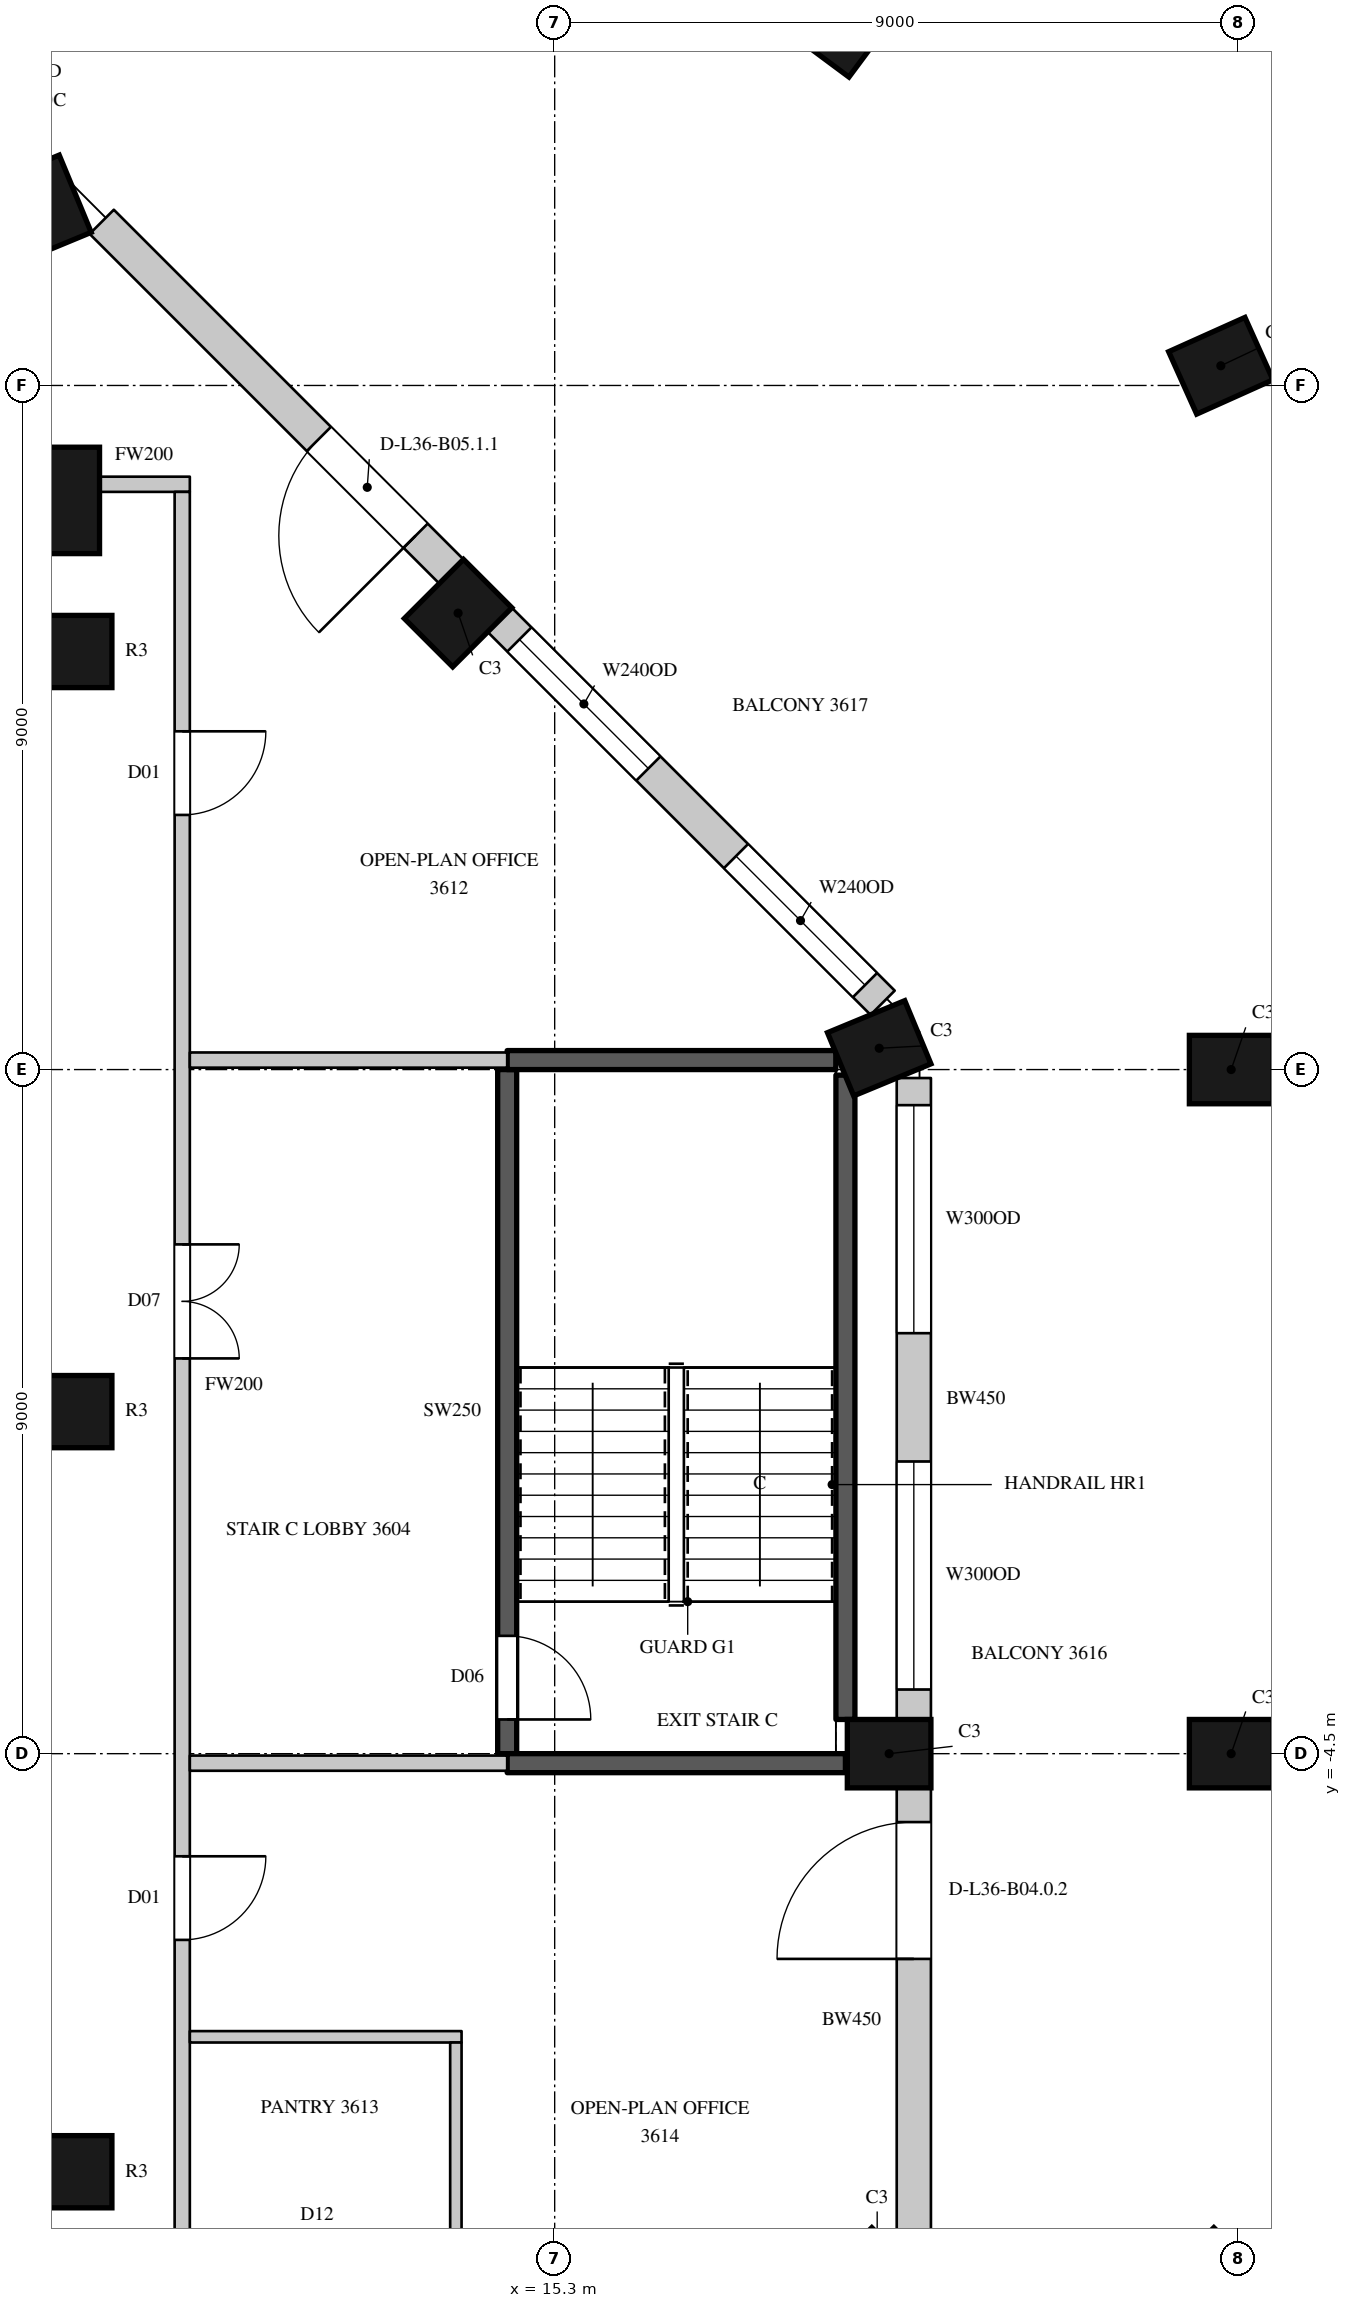
"""IFC4 building model, lengths in metres.
Left out: names, types, materials, properties, quantities, classifications, styles, units other than length and angle.
Written with IfcOpenShell. Run it as: python <this file> out.ifc"""

import sys

from ifc_helpers import new_model, si_unit, direction, frame, frame_2d, origin, origin_2d, place, context, subcontext, project, spatial, rectangle, circle, extrude, element, fill, save


model = new_model("IFC4")
c1 = context("Model", 3, precision=1e-05, world=origin(), true_north=direction((0.0, 1.0)))
c2 = subcontext(c1, "Body", "Model", "MODEL_VIEW")
j1 = project(units=[si_unit("LENGTHUNIT", "METRE"), si_unit("PLANEANGLEUNIT", "RADIAN")], contexts=[c1])
p1 = place(None, origin())
s1 = spatial("IfcSite", under=j1, at=p1, CompositionType="ELEMENT")
p2 = place(p1, origin())
s2 = spatial("IfcBuilding", under=s1, at=p2, CompositionType="ELEMENT")
p3 = place(p2, frame((0.0, 0.0, 168.7)))
s3 = spatial("IfcBuildingStorey", under=s2, at=p3, CompositionType="ELEMENT", Elevation=168.7)
for number, where, z_axis, x_axis in (
    (1, (19.543, -11.443, 0.0), (0.0, 0.0, 1.0), (0.707, 0.707, 0.0)),
    (2, (19.7, -4.5, 0.0), (0.0, 0.0, 1.0), (0.0, 1.0, 0.0)),
    (3, (19.57, 4.78, 0.0), (0.0, 0.0, 1.0), (-0.383, 0.924, 0.0)),
    (4, (14.029, 10.505, 0.0), (0.0, 0.0, 1.0), (-0.707, 0.707, 0.0)),
    (5, (8.576, 15.85, 0.0), (0.0, 0.0, 1.0), (-0.924, -0.383, 0.0)),
):
    element("IfcColumn", number, at=place(p3, frame(where, z_axis=z_axis, x_axis=x_axis)), inside=s3, PredefinedType="COLUMN", context=c2, shape_type="SweptSolid", body=[
        extrude(rectangle(XDim=0.9, YDim=1.1, at=origin_2d()), origin(), (0.0, 0.0, 1.0), 4.1),
    ])
p4 = place(p3, frame((8.612, 11.988, 0.0), z_axis=(0.0, 0.0, 1.0), x_axis=(1.0, 0.0, 0.0)))
e6 = element("IfcColumn", 6, at=p4, inside=s3, PredefinedType="COLUMN", context=c2, shape_type="SweptSolid", body=[
    extrude(circle(Radius=0.7, at=origin_2d()), origin(), (0.0, 0.0, 1.0), 4.1),
])
for number, where, z_axis, x_axis in (
    (7, (24.043, -11.443, 0.0), (0.0, 0.0, 1.0), (0.707, 0.707, 0.0)),
    (8, (24.2, -4.5, 0.0), (0.0, 0.0, 1.0), (0.0, 1.0, 0.0)),
    (9, (24.2, 4.5, 0.0), (0.0, 0.0, 1.0), (0.0, 1.0, 0.0)),
    (10, (24.064, 13.759, 0.0), (0.0, 0.0, 1.0), (-0.41, 0.912, 0.0)),
    (11, (19.138, 18.268, 0.0), (0.0, 0.0, 1.0), (-0.803, 0.596, 0.0)),
):
    element("IfcColumn", number, at=place(p3, frame(where, z_axis=z_axis, x_axis=x_axis)), inside=s3, PredefinedType="COLUMN", context=c2, shape_type="SweptSolid", body=[
        extrude(rectangle(XDim=0.9, YDim=1.1, at=origin_2d()), origin(), (0.0, 0.0, 1.0), 4.1),
    ])
for number, where, z_axis, x_axis in (
    (12, (9.0, -10.0, 0.0), (0.0, 0.0, 1.0), (1.0, 0.0, 0.0)),
    (13, (9.0, 0.0, 0.0), (0.0, 0.0, 1.0), (1.0, 0.0, 0.0)),
    (14, (9.0, 10.0, 0.0), (0.0, 0.0, 1.0), (1.0, 0.0, 0.0)),
):
    element("IfcColumn", number, at=place(p3, frame(where, z_axis=z_axis, x_axis=x_axis)), inside=s3, PredefinedType="COLUMN", context=c2, shape_type="SweptSolid", body=[
        extrude(circle(Radius=0.475, at=origin_2d()), origin(), (0.0, 0.0, 1.0), 4.1),
    ])
p5 = place(p3, frame((20.025, -11.064, 0.0), z_axis=(0.0, 0.0, 1.0), x_axis=(0.0, 1.0, 0.0)))
e15 = element("IfcWall", 15, at=p5, inside=s3, PredefinedType="SOLIDWALL", context=c2, shape_type="SweptSolid", body=[
    extrude(rectangle(XDim=6.114, YDim=0.45, at=frame_2d((3.057, 0.0))), origin(), (0.0, 0.0, 1.0), 3.8),
])
p6 = place(p5, frame((3.864, 0.0, 0.0)))
e16 = element("IfcOpeningElement", 16, at=p6, cuts=e15, PredefinedType="OPENING", context=c2, shape_type="SweptSolid", body=[
    extrude(rectangle(XDim=1.8, YDim=2.4, at=frame_2d((0.9, 1.2))), frame((0.0, 0.235, 0.0), z_axis=(0.0, -1.0, 0.0), x_axis=(1.0, 0.0, 0.0)), (0.0, 0.0, 1.0), 0.47),
])
p7 = place(p3, frame((20.025, -4.05, 0.0), z_axis=(0.0, 0.0, 1.0), x_axis=(0.0, 1.0, 0.0)))
e17 = element("IfcWall", 17, at=p7, inside=s3, PredefinedType="SOLIDWALL", context=c2, shape_type="SweptSolid", body=[
    extrude(rectangle(XDim=8.439, YDim=0.45, at=frame_2d((4.219, 0.0))), origin(), (0.0, 0.0, 1.0), 3.8),
])
p8 = place(p7, frame((0.394, 0.0, 1.05)))
e18 = element("IfcOpeningElement", 18, at=p8, cuts=e17, PredefinedType="OPENING", context=c2, shape_type="SweptSolid", body=[
    extrude(rectangle(XDim=3.0, YDim=2.4, at=frame_2d((1.5, 1.2))), frame((0.0, 0.235, 0.0), z_axis=(0.0, -1.0, 0.0), x_axis=(1.0, 0.0, 0.0)), (0.0, 0.0, 1.0), 0.47),
])
p9 = place(p7, frame((5.082, 0.0, 1.05)))
e19 = element("IfcOpeningElement", 19, at=p9, cuts=e17, PredefinedType="OPENING", context=c2, shape_type="SweptSolid", body=[
    extrude(rectangle(XDim=3.0, YDim=2.4, at=frame_2d((1.5, 1.2))), frame((0.0, 0.235, 0.0), z_axis=(0.0, -1.0, 0.0), x_axis=(1.0, 0.0, 0.0)), (0.0, 0.0, 1.0), 0.47),
])
p10 = place(p3, frame((19.615, 5.379, 0.0), z_axis=(0.0, 0.0, 1.0), x_axis=(-0.707089646058, 0.7071239159, 0.0)))
e20 = element("IfcWall", 20, at=p10, inside=s3, PredefinedType="SOLIDWALL", context=c2, shape_type="SweptSolid", body=[
    extrude(rectangle(XDim=7.124, YDim=0.45, at=frame_2d((3.562, 0.0))), origin(), (0.0, 0.0, 1.0), 3.8),
])
p11 = place(p10, frame((0.328, 0.0, 1.05)))
e21 = element("IfcOpeningElement", 21, at=p11, cuts=e20, PredefinedType="OPENING", context=c2, shape_type="SweptSolid", body=[
    extrude(rectangle(XDim=2.4, YDim=2.4, at=frame_2d((1.2, 1.2))), frame((0.0, 0.235, 0.0), z_axis=(0.0, -1.0, 0.0), x_axis=(1.0, 0.0, 0.0)), (0.0, 0.0, 1.0), 0.47),
])
p12 = place(p10, frame((4.359, 0.0, 1.05)))
e22 = element("IfcOpeningElement", 22, at=p12, cuts=e20, PredefinedType="OPENING", context=c2, shape_type="SweptSolid", body=[
    extrude(rectangle(XDim=2.4, YDim=2.4, at=frame_2d((1.2, 1.2))), frame((0.0, 0.235, 0.0), z_axis=(0.0, -1.0, 0.0), x_axis=(1.0, 0.0, 0.0)), (0.0, 0.0, 1.0), 0.47),
])
p13 = place(p3, frame((13.941, 11.053, 0.0), z_axis=(0.0, 0.0, 1.0), x_axis=(-0.707106781187, 0.707106781187, 0.0)))
e23 = element("IfcWall", 23, at=p13, inside=s3, PredefinedType="SOLIDWALL", context=c2, shape_type="SweptSolid", body=[
    extrude(rectangle(XDim=6.505, YDim=0.45, at=frame_2d((3.252, 0.0))), origin(), (0.0, 0.0, 1.0), 3.8),
])
p14 = place(p13, frame((0.665, 0.0, 0.0)))
e24 = element("IfcOpeningElement", 24, at=p14, cuts=e23, PredefinedType="OPENING", context=c2, shape_type="SweptSolid", body=[
    extrude(rectangle(XDim=1.8, YDim=2.4, at=frame_2d((0.9, 1.2))), frame((0.0, 0.235, 0.0), z_axis=(0.0, -1.0, 0.0), x_axis=(1.0, 0.0, 0.0)), (0.0, 0.0, 1.0), 0.47),
])
p15 = place(p3, frame((21.1, -5.1, 0.0), z_axis=(0.0, 0.0, 1.0), x_axis=(0.0, 1.0, 0.0)))
e25 = element("IfcWall", 25, at=p15, inside=s3, PredefinedType="SOLIDWALL", context=c2, shape_type="SweptSolid", body=[
    extrude(rectangle(XDim=3.583, YDim=0.45, at=frame_2d((1.792, 0.0))), origin(), (0.0, 0.0, 1.0), 0.6),
])
p16 = place(p3, frame((21.1, -0.617, 0.0), z_axis=(0.0, 0.0, 1.0), x_axis=(0.0, 1.0, 0.0)))
e26 = element("IfcWall", 26, at=p16, inside=s3, PredefinedType="SOLIDWALL", context=c2, shape_type="SweptSolid", body=[
    extrude(rectangle(XDim=2.567, YDim=0.45, at=frame_2d((1.283, 0.0))), origin(), (0.0, 0.0, 1.0), 0.6),
])
p17 = place(p3, frame((18.65, 7.864, 0.0), z_axis=(0.0, 0.0, 1.0), x_axis=(-0.707059037574, 0.707154521576, 0.0)))
e27 = element("IfcWall", 27, at=p17, inside=s3, PredefinedType="SOLIDWALL", context=c2, shape_type="SweptSolid", body=[
    extrude(rectangle(XDim=2.557, YDim=0.45, at=frame_2d((1.278, 0.0))), origin(), (0.0, 0.0, 1.0), 0.6),
])
p18 = place(p3, frame((16.206, 10.308, 0.0), z_axis=(0.0, 0.0, 1.0), x_axis=(-0.707057827829, 0.707155731156, 0.0)))
e28 = element("IfcWall", 28, at=p18, inside=s3, PredefinedType="SOLIDWALL", context=c2, shape_type="SweptSolid", body=[
    extrude(rectangle(XDim=2.494, YDim=0.45, at=frame_2d((1.247, 0.0))), origin(), (0.0, 0.0, 1.0), 0.6),
])
p19 = place(p3, frame((12.251, 14.263, 0.0), z_axis=(0.0, 0.0, 1.0), x_axis=(-0.707039709166, 0.707173846846, 0.0)))
e29 = element("IfcWall", 29, at=p19, inside=s3, PredefinedType="SOLIDWALL", context=c2, shape_type="SweptSolid", body=[
    extrude(rectangle(XDim=1.82, YDim=0.45, at=frame_2d((0.91, 0.0))), origin(), (0.0, 0.0, 1.0), 0.6),
])
p20 = place(p3, frame((9.296, 12.2, 0.0), z_axis=(0.0, 0.0, 1.0), x_axis=(1.0, 0.0, 0.0)))
e30 = element("IfcWall", 30, at=p20, inside=s3, PredefinedType="PARTITIONING", context=c2, shape_type="SweptSolid", body=[
    extrude(rectangle(XDim=1.204, YDim=0.2, at=frame_2d((0.602, 0.0))), origin(), (0.0, 0.0, 1.0), 3.8),
])
p21 = place(p3, frame((10.4, -11.4, 0.0), z_axis=(0.0, 0.0, 1.0), x_axis=(0.0, 1.0, 0.0)))
e31 = element("IfcWall", 31, at=p21, inside=s3, PredefinedType="PARTITIONING", context=c2, shape_type="SweptSolid", body=[
    extrude(rectangle(XDim=23.5, YDim=0.2, at=frame_2d((11.75, 0.0))), origin(), (0.0, 0.0, 1.0), 3.8),
])
p22 = place(p21, frame((12.1, 0.0, 0.0)))
e32 = element("IfcOpeningElement", 32, at=p22, cuts=e31, PredefinedType="OPENING", context=c2, shape_type="SweptSolid", body=[
    extrude(rectangle(XDim=1.5, YDim=2.4, at=frame_2d((0.75, 1.2))), frame((0.0, 0.11, 0.0), z_axis=(0.0, -1.0, 0.0), x_axis=(1.0, 0.0, 0.0)), (0.0, 0.0, 1.0), 0.22),
])
p23 = place(p21, frame((19.25, 0.0, 0.0)))
e33 = element("IfcOpeningElement", 33, at=p23, cuts=e31, PredefinedType="OPENING", context=c2, shape_type="SweptSolid", body=[
    extrude(rectangle(XDim=1.1, YDim=2.4, at=frame_2d((0.55, 1.2))), frame((0.0, 0.11, 0.0), z_axis=(0.0, -1.0, 0.0), x_axis=(1.0, 0.0, 0.0)), (0.0, 0.0, 1.0), 0.22),
])
p24 = place(p21, frame((4.45, 0.0, 0.0)))
e34 = element("IfcOpeningElement", 34, at=p24, cuts=e31, PredefinedType="OPENING", context=c2, shape_type="SweptSolid", body=[
    extrude(rectangle(XDim=1.1, YDim=2.4, at=frame_2d((0.55, 1.2))), frame((0.0, 0.11, 0.0), z_axis=(0.0, -1.0, 0.0), x_axis=(1.0, 0.0, 0.0)), (0.0, 0.0, 1.0), 0.22),
])
for number, where, z_axis, x_axis in (
    (35, (10.5, -4.625, 0.0), (0.0, 0.0, 1.0), (1.0, 0.0, 0.0)),
    (36, (10.5, 4.625, 0.0), (0.0, 0.0, 1.0), (1.0, 0.0, 0.0)),
):
    element("IfcWall", number, at=place(p3, frame(where, z_axis=z_axis, x_axis=x_axis)), inside=s3, PredefinedType="PARTITIONING", context=c2, shape_type="SweptSolid", body=[
        extrude(rectangle(XDim=4.175, YDim=0.2, at=frame_2d((2.087, 0.0))), origin(), (0.0, 0.0, 1.0), 3.8),
    ])
p25 = place(p3, frame((10.5, -8.225, 0.0), z_axis=(0.0, 0.0, 1.0), x_axis=(1.0, 0.0, 0.0)))
e37 = element("IfcWall", 37, at=p25, inside=s3, PredefinedType="PARTITIONING", context=c2, shape_type="SweptSolid", body=[
    extrude(rectangle(XDim=3.575, YDim=0.15, at=frame_2d((1.788, 0.0))), origin(), (0.0, 0.0, 1.0), 3.15),
])
p26 = place(p3, frame((14.0, -10.85, 0.0), z_axis=(0.0, 0.0, 1.0), x_axis=(0.0, 1.0, 0.0)))
e38 = element("IfcWall", 38, at=p26, inside=s3, PredefinedType="PARTITIONING", context=c2, shape_type="SweptSolid", body=[
    extrude(rectangle(XDim=2.55, YDim=0.15, at=frame_2d((1.275, 0.0))), origin(), (0.0, 0.0, 1.0), 3.8),
])
p27 = place(p3, frame((14.675, -4.5, 0.0), z_axis=(0.0, 0.0, 1.0), x_axis=(0.0, 1.0, 0.0)))
e39 = element("IfcWall", 39, at=p27, inside=s3, PredefinedType="SHEAR", context=c2, shape_type="SweptSolid", body=[
    extrude(rectangle(XDim=9.0, YDim=0.25, at=frame_2d((4.5, 0.0))), origin(), (0.0, 0.0, 1.0), 3.8),
])
p28 = place(p27, frame((0.45, 0.0, 0.0)))
e40 = element("IfcOpeningElement", 40, at=p28, cuts=e39, PredefinedType="OPENING", context=c2, shape_type="SweptSolid", body=[
    extrude(rectangle(XDim=1.1, YDim=2.2, at=frame_2d((0.55, 1.1))), frame((0.0, 0.135, 0.0), z_axis=(0.0, -1.0, 0.0), x_axis=(1.0, 0.0, 0.0)), (0.0, 0.0, 1.0), 0.27),
])
p29 = place(p3, frame((14.675, -4.625, 0.0), z_axis=(0.0, 0.0, 1.0), x_axis=(1.0, 0.0, 0.0)))
e41 = element("IfcWall", 41, at=p29, inside=s3, PredefinedType="SHEAR", context=c2, shape_type="SweptSolid", body=[
    extrude(rectangle(XDim=4.45, YDim=0.25, at=frame_2d((2.225, 0.0))), origin(), (0.0, 0.0, 1.0), 3.8),
])
p30 = place(p3, frame((14.675, 4.625, 0.0), z_axis=(0.0, 0.0, 1.0), x_axis=(1.0, 0.0, 0.0)))
e42 = element("IfcWall", 42, at=p30, inside=s3, PredefinedType="SHEAR", context=c2, shape_type="SweptSolid", body=[
    extrude(rectangle(XDim=4.324, YDim=0.25, at=frame_2d((2.162, 0.0))), origin(), (0.0, 0.0, 1.0), 3.8),
])
p31 = place(p3, frame((19.125, -4.05, 0.0), z_axis=(0.0, 0.0, 1.0), x_axis=(0.0, 1.0, 0.0)))
e43 = element("IfcWall", 43, at=p31, inside=s3, PredefinedType="SHEAR", context=c2, shape_type="SweptSolid", body=[
    extrude(rectangle(XDim=8.477, YDim=0.25, at=frame_2d((4.238, 0.0))), origin(), (0.0, 0.0, 1.0), 3.8),
])
p32 = place(p6, origin())
e44 = element("IfcDoor", 44, at=p32, inside=s3, OperationType="SLIDING_TO_LEFT", PredefinedType="DOOR", context=c2, shape_type="SweptSolid", body=[
    extrude(rectangle(XDim=1.8, YDim=2.4, at=frame_2d((0.9, 1.2))), frame((0.0, 0.13, 0.0), z_axis=(0.0, -1.0, 0.0), x_axis=(1.0, 0.0, 0.0)), (0.0, 0.0, 1.0), 0.05),
])
fill(e16, e44)
p33 = place(p8, origin())
e45 = element("IfcWindow", 45, at=p33, inside=s3, PartitioningType="SINGLE_PANEL", PredefinedType="WINDOW", context=c2, shape_type="SweptSolid", body=[
    extrude(rectangle(XDim=3.0, YDim=2.4, at=frame_2d((1.5, 1.2))), frame((0.0, 0.135, 0.0), z_axis=(0.0, -1.0, 0.0), x_axis=(1.0, 0.0, 0.0)), (0.0, 0.0, 1.0), 0.06),
])
fill(e18, e45)
p34 = place(p9, origin())
e46 = element("IfcWindow", 46, at=p34, inside=s3, PartitioningType="SINGLE_PANEL", PredefinedType="WINDOW", context=c2, shape_type="SweptSolid", body=[
    extrude(rectangle(XDim=3.0, YDim=2.4, at=frame_2d((1.5, 1.2))), frame((0.0, 0.135, 0.0), z_axis=(0.0, -1.0, 0.0), x_axis=(1.0, 0.0, 0.0)), (0.0, 0.0, 1.0), 0.06),
])
fill(e19, e46)
p35 = place(p11, origin())
e47 = element("IfcWindow", 47, at=p35, inside=s3, PartitioningType="SINGLE_PANEL", PredefinedType="WINDOW", context=c2, shape_type="SweptSolid", body=[
    extrude(rectangle(XDim=2.4, YDim=2.4, at=frame_2d((1.2, 1.2))), frame((0.0, 0.135, 0.0), z_axis=(0.0, -1.0, 0.0), x_axis=(1.0, 0.0, 0.0)), (0.0, 0.0, 1.0), 0.06),
])
fill(e21, e47)
p36 = place(p12, origin())
e48 = element("IfcWindow", 48, at=p36, inside=s3, PartitioningType="SINGLE_PANEL", PredefinedType="WINDOW", context=c2, shape_type="SweptSolid", body=[
    extrude(rectangle(XDim=2.4, YDim=2.4, at=frame_2d((1.2, 1.2))), frame((0.0, 0.135, 0.0), z_axis=(0.0, -1.0, 0.0), x_axis=(1.0, 0.0, 0.0)), (0.0, 0.0, 1.0), 0.06),
])
fill(e22, e48)
p37 = place(p14, origin())
e49 = element("IfcDoor", 49, at=p37, inside=s3, OperationType="SLIDING_TO_LEFT", PredefinedType="DOOR", context=c2, shape_type="SweptSolid", body=[
    extrude(rectangle(XDim=1.8, YDim=2.4, at=frame_2d((0.9, 1.2))), frame((0.0, 0.13, 0.0), z_axis=(0.0, -1.0, 0.0), x_axis=(1.0, 0.0, 0.0)), (0.0, 0.0, 1.0), 0.05),
])
fill(e24, e49)
p38 = place(p22, origin())
e50 = element("IfcDoor", 50, at=p38, inside=s3, OperationType="DOUBLE_DOOR_SINGLE_SWING", PredefinedType="DOOR", context=c2, shape_type="SweptSolid", body=[
    extrude(rectangle(XDim=1.5, YDim=2.4, at=frame_2d((0.75, 1.2))), frame((0.0, 0.025, 0.0), z_axis=(0.0, -1.0, 0.0), x_axis=(1.0, 0.0, 0.0)), (0.0, 0.0, 1.0), 0.05),
])
fill(e32, e50)
p39 = place(p23, origin())
e51 = element("IfcDoor", 51, at=p39, inside=s3, OperationType="SINGLE_SWING_LEFT", PredefinedType="DOOR", context=c2, shape_type="SweptSolid", body=[
    extrude(rectangle(XDim=1.1, YDim=2.4, at=frame_2d((0.55, 1.2))), frame((0.0, 0.025, 0.0), z_axis=(0.0, -1.0, 0.0), x_axis=(1.0, 0.0, 0.0)), (0.0, 0.0, 1.0), 0.05),
])
fill(e33, e51)
p40 = place(p24, origin())
e52 = element("IfcDoor", 52, at=p40, inside=s3, OperationType="SINGLE_SWING_LEFT", PredefinedType="DOOR", context=c2, shape_type="SweptSolid", body=[
    extrude(rectangle(XDim=1.1, YDim=2.4, at=frame_2d((0.55, 1.2))), frame((0.0, 0.025, 0.0), z_axis=(0.0, -1.0, 0.0), x_axis=(1.0, 0.0, 0.0)), (0.0, 0.0, 1.0), 0.05),
])
fill(e34, e52)
p41 = place(p28, origin())
e53 = element("IfcDoor", 53, at=p41, inside=s3, OperationType="SINGLE_SWING_RIGHT", PredefinedType="DOOR", context=c2, shape_type="SweptSolid", body=[
    extrude(rectangle(XDim=1.1, YDim=2.2, at=frame_2d((0.55, 1.1))), frame((0.0, 0.025, 0.0), z_axis=(0.0, -1.0, 0.0), x_axis=(1.0, 0.0, 0.0)), (0.0, 0.0, 1.0), 0.05),
])
fill(e40, e53)
save(model, sys.argv[1])
